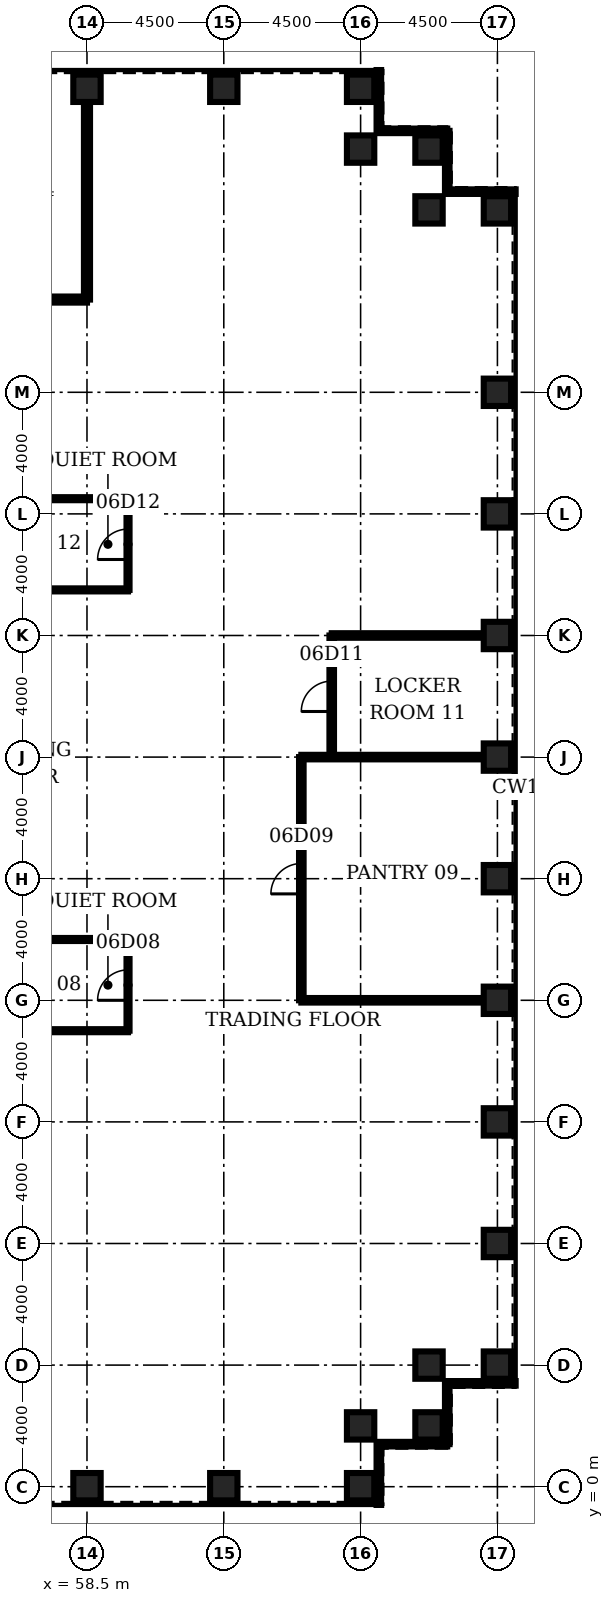
"""IFC4 building model, lengths in metres.
Left out: names, types, materials, properties, quantities, classifications, styles, units other than length and angle.
Written with IfcOpenShell. Run it as: python <this file> out.ifc"""

import sys

from ifc_helpers import new_model, si_unit, direction, frame, frame_2d, origin, origin_2d, place, context, subcontext, project, spatial, rectangle, hollow_rectangle, extrude, element, fill, save


model = new_model("IFC4")
c1 = context("Model", 3, precision=1e-05, world=origin(), true_north=direction((0.0, 1.0)))
c2 = subcontext(c1, "Body", "Model", "MODEL_VIEW")
j1 = project(units=[si_unit("LENGTHUNIT", "METRE"), si_unit("PLANEANGLEUNIT", "RADIAN")], contexts=[c1])
p1 = place(None, origin())
s1 = spatial("IfcSite", under=j1, at=p1, CompositionType="ELEMENT")
p2 = place(p1, origin())
s2 = spatial("IfcBuilding", under=s1, at=p2, CompositionType="ELEMENT")
p3 = place(p2, frame((0.0, 0.0, 32.0)))
s3 = spatial("IfcBuildingStorey", under=s2, at=p3, CompositionType="ELEMENT", Elevation=32.0)
for number, where, z_axis, x_axis in (
    (1, (58.5, 0.0, 0.0), (0.0, 0.0, 1.0), (0.0, 1.0, 0.0)),
    (2, (63.0, 0.0, 0.0), (0.0, 0.0, 1.0), (0.0, 1.0, 0.0)),
    (3, (67.5, 0.0, 0.0), (0.0, 0.0, 1.0), (0.0, 1.0, 0.0)),
    (4, (67.5, 2.0, 0.0), (0.0, 0.0, 1.0), (0.0, 1.0, 0.0)),
    (5, (69.75, 2.0, 0.0), (0.0, 0.0, 1.0), (1.0, 0.0, 0.0)),
    (6, (69.75, 4.0, 0.0), (0.0, 0.0, 1.0), (1.0, 0.0, 0.0)),
    (7, (72.0, 4.0, 0.0), (0.0, 0.0, 1.0), (1.0, 0.0, 0.0)),
    (8, (72.0, 8.0, 0.0), (0.0, 0.0, 1.0), (1.0, 0.0, 0.0)),
    (9, (72.0, 12.0, 0.0), (0.0, 0.0, 1.0), (1.0, 0.0, 0.0)),
    (10, (72.0, 16.0, 0.0), (0.0, 0.0, 1.0), (1.0, 0.0, 0.0)),
    (11, (72.0, 20.0, 0.0), (0.0, 0.0, 1.0), (1.0, 0.0, 0.0)),
    (12, (72.0, 24.0, 0.0), (0.0, 0.0, 1.0), (1.0, 0.0, 0.0)),
    (13, (72.0, 28.0, 0.0), (0.0, 0.0, 1.0), (1.0, 0.0, 0.0)),
    (14, (72.0, 32.0, 0.0), (0.0, 0.0, 1.0), (1.0, 0.0, 0.0)),
    (15, (72.0, 36.0, 0.0), (0.0, 0.0, 1.0), (1.0, 0.0, 0.0)),
    (16, (72.0, 42.0, 0.0), (0.0, 0.0, 1.0), (1.0, 0.0, 0.0)),
    (17, (69.75, 42.0, 0.0), (0.0, 0.0, 1.0), (1.0, 0.0, 0.0)),
    (18, (69.75, 44.0, 0.0), (0.0, 0.0, 1.0), (1.0, 0.0, 0.0)),
    (19, (67.5, 44.0, 0.0), (0.0, 0.0, 1.0), (0.0, 1.0, 0.0)),
    (20, (67.5, 46.0, 0.0), (0.0, 0.0, 1.0), (0.0, 1.0, 0.0)),
    (21, (63.0, 46.0, 0.0), (0.0, 0.0, 1.0), (0.0, 1.0, 0.0)),
    (22, (58.5, 46.0, 0.0), (0.0, 0.0, 1.0), (0.0, 1.0, 0.0)),
):
    element("IfcColumn", number, at=place(p3, frame(where, z_axis=z_axis, x_axis=x_axis)), inside=s3, PredefinedType="COLUMN", context=c2, shape_type="SweptSolid", body=[
        extrude(hollow_rectangle(XDim=0.9, YDim=0.9, WallThickness=0.12, at=origin_2d()), origin(), (0.0, 0.0, 1.0), 4.5),
    ])
p4 = place(p3, frame((56.85, 15.0, 0.0), z_axis=(0.0, 0.0, 1.0), x_axis=(1.0, 0.0, 0.0)))
e23 = element("IfcWall", 23, at=p4, inside=s3, PredefinedType="PARTITIONING", context=c2, shape_type="SweptSolid", body=[
    extrude(rectangle(XDim=3.0, YDim=0.1, at=frame_2d((1.5, 0.0))), origin(), (0.0, 0.0, 1.0), 3.0),
])
p5 = place(p3, frame((65.55, 16.0, 0.0), z_axis=(0.0, 0.0, 1.0), x_axis=(1.0, 0.0, 0.0)))
e24 = element("IfcWall", 24, at=p5, inside=s3, PredefinedType="PARTITIONING", context=c2, shape_type="SweptSolid", body=[
    extrude(rectangle(XDim=6.0, YDim=0.15, at=frame_2d((3.0, 0.0))), origin(), (0.0, 0.0, 1.0), 3.0),
])
p6 = place(p3, frame((56.85, 18.0, 0.0), z_axis=(0.0, 0.0, 1.0), x_axis=(1.0, 0.0, 0.0)))
e25 = element("IfcWall", 25, at=p6, inside=s3, PredefinedType="PARTITIONING", context=c2, shape_type="SweptSolid", body=[
    extrude(rectangle(XDim=3.0, YDim=0.1, at=frame_2d((1.5, 0.0))), origin(), (0.0, 0.0, 1.0), 3.0),
])
p7 = place(p3, frame((65.55, 24.0, 0.0), z_axis=(0.0, 0.0, 1.0), x_axis=(1.0, 0.0, 0.0)))
e26 = element("IfcWall", 26, at=p7, inside=s3, PredefinedType="PARTITIONING", context=c2, shape_type="SweptSolid", body=[
    extrude(rectangle(XDim=6.0, YDim=0.15, at=frame_2d((3.0, 0.0))), origin(), (0.0, 0.0, 1.0), 3.0),
])
p8 = place(p3, frame((66.55, 28.0, 0.0), z_axis=(0.0, 0.0, 1.0), x_axis=(1.0, 0.0, 0.0)))
e27 = element("IfcWall", 27, at=p8, inside=s3, PredefinedType="PARTITIONING", context=c2, shape_type="SweptSolid", body=[
    extrude(rectangle(XDim=5.0, YDim=0.15, at=frame_2d((2.5, 0.0))), origin(), (0.0, 0.0, 1.0), 3.0),
])
for number, where, z_axis, x_axis in (
    (28, (56.85, 29.5, 0.0), (0.0, 0.0, 1.0), (1.0, 0.0, 0.0)),
    (29, (56.85, 32.5, 0.0), (0.0, 0.0, 1.0), (1.0, 0.0, 0.0)),
):
    element("IfcWall", number, at=place(p3, frame(where, z_axis=z_axis, x_axis=x_axis)), inside=s3, PredefinedType="PARTITIONING", context=c2, shape_type="SweptSolid", body=[
        extrude(rectangle(XDim=3.0, YDim=0.1, at=frame_2d((1.5, 0.0))), origin(), (0.0, 0.0, 1.0), 3.0),
    ])
p9 = place(p3, frame((49.5, 39.05, 0.0), z_axis=(0.0, 0.0, 1.0), x_axis=(1.0, 0.0, 0.0)))
e30 = element("IfcWall", 30, at=p9, inside=s3, PredefinedType="PARTITIONING", context=c2, shape_type="SweptSolid", body=[
    extrude(rectangle(XDim=9.0, YDim=0.2, at=frame_2d((4.5, 0.0))), origin(), (0.0, 0.0, 1.0), 3.0),
])
p10 = place(p9, frame((0.45, 0.0, 0.0)))
e31 = element("IfcOpeningElement", 31, at=p10, cuts=e30, PredefinedType="OPENING", context=c2, shape_type="SweptSolid", body=[
    extrude(rectangle(XDim=1.6, YDim=2.1, at=frame_2d((0.8, 1.05))), frame((0.0, 0.11, 0.0), z_axis=(0.0, -1.0, 0.0), x_axis=(1.0, 0.0, 0.0)), (0.0, 0.0, 1.0), 0.22),
])
p11 = place(p3, frame((58.5, 39.05, 0.0), z_axis=(0.0, 0.0, 1.0), x_axis=(0.0, 1.0, 0.0)))
e32 = element("IfcWall", 32, at=p11, inside=s3, PredefinedType="PARTITIONING", context=c2, shape_type="SweptSolid", body=[
    extrude(rectangle(XDim=6.5, YDim=0.2, at=frame_2d((3.25, 0.0))), origin(), (0.0, 0.0, 1.0), 3.0),
])
p12 = place(p3, frame((59.85, 15.0, 0.0), z_axis=(0.0, 0.0, 1.0), x_axis=(0.0, 1.0, 0.0)))
e33 = element("IfcWall", 33, at=p12, inside=s3, PredefinedType="PARTITIONING", context=c2, shape_type="SweptSolid", body=[
    extrude(rectangle(XDim=3.0, YDim=0.1, at=frame_2d((1.5, 0.0))), origin(), (0.0, 0.0, 1.0), 3.0),
])
p13 = place(p12, frame((1.0, 0.0, 0.0)))
e34 = element("IfcOpeningElement", 34, at=p13, cuts=e33, PredefinedType="OPENING", context=c2, shape_type="SweptSolid", body=[
    extrude(rectangle(XDim=1.0, YDim=2.1, at=frame_2d((0.5, 1.05))), frame((0.0, 0.06, 0.0), z_axis=(0.0, -1.0, 0.0), x_axis=(1.0, 0.0, 0.0)), (0.0, 0.0, 1.0), 0.12),
])
p14 = place(p3, frame((59.85, 29.5, 0.0), z_axis=(0.0, 0.0, 1.0), x_axis=(0.0, 1.0, 0.0)))
e35 = element("IfcWall", 35, at=p14, inside=s3, PredefinedType="PARTITIONING", context=c2, shape_type="SweptSolid", body=[
    extrude(rectangle(XDim=3.0, YDim=0.1, at=frame_2d((1.5, 0.0))), origin(), (0.0, 0.0, 1.0), 3.0),
])
p15 = place(p14, frame((1.0, 0.0, 0.0)))
e36 = element("IfcOpeningElement", 36, at=p15, cuts=e35, PredefinedType="OPENING", context=c2, shape_type="SweptSolid", body=[
    extrude(rectangle(XDim=1.0, YDim=2.1, at=frame_2d((0.5, 1.05))), frame((0.0, 0.06, 0.0), z_axis=(0.0, -1.0, 0.0), x_axis=(1.0, 0.0, 0.0)), (0.0, 0.0, 1.0), 0.12),
])
p16 = place(p3, frame((65.55, 16.0, 0.0), z_axis=(0.0, 0.0, 1.0), x_axis=(0.0, 1.0, 0.0)))
e37 = element("IfcWall", 37, at=p16, inside=s3, PredefinedType="PARTITIONING", context=c2, shape_type="SweptSolid", body=[
    extrude(rectangle(XDim=8.0, YDim=0.15, at=frame_2d((4.0, 0.0))), origin(), (0.0, 0.0, 1.0), 3.0),
])
p17 = place(p16, frame((3.5, 0.0, 0.0)))
e38 = element("IfcOpeningElement", 38, at=p17, cuts=e37, PredefinedType="OPENING", context=c2, shape_type="SweptSolid", body=[
    extrude(rectangle(XDim=1.0, YDim=2.1, at=frame_2d((0.5, 1.05))), frame((0.0, 0.085, 0.0), z_axis=(0.0, -1.0, 0.0), x_axis=(1.0, 0.0, 0.0)), (0.0, 0.0, 1.0), 0.17),
])
p18 = place(p3, frame((66.55, 24.0, 0.0), z_axis=(0.0, 0.0, 1.0), x_axis=(0.0, 1.0, 0.0)))
e39 = element("IfcWall", 39, at=p18, inside=s3, PredefinedType="PARTITIONING", context=c2, shape_type="SweptSolid", body=[
    extrude(rectangle(XDim=4.0, YDim=0.15, at=frame_2d((2.0, 0.0))), origin(), (0.0, 0.0, 1.0), 3.0),
])
p19 = place(p18, frame((1.5, 0.0, 0.0)))
e40 = element("IfcOpeningElement", 40, at=p19, cuts=e39, PredefinedType="OPENING", context=c2, shape_type="SweptSolid", body=[
    extrude(rectangle(XDim=1.0, YDim=2.1, at=frame_2d((0.5, 1.05))), frame((0.0, 0.085, 0.0), z_axis=(0.0, -1.0, 0.0), x_axis=(1.0, 0.0, 0.0)), (0.0, 0.0, 1.0), 0.17),
])
p20 = place(p3, frame((68.1, -0.6, 0.0), z_axis=(0.0, 0.0, 1.0), x_axis=(0.0, 1.0, 0.0)))
e41 = element("IfcWall", 41, at=p20, inside=s3, PredefinedType="ELEMENTEDWALL", context=c2, shape_type="SweptSolid", body=[
    extrude(rectangle(XDim=2.0, YDim=0.15, at=frame_2d((1.0, 0.0))), origin(), (0.0, 0.0, 1.0), 4.32),
])
p21 = place(p3, frame((68.1, 1.4, 0.0), z_axis=(0.0, 0.0, 1.0), x_axis=(1.0, 0.0, 0.0)))
e42 = element("IfcWall", 42, at=p21, inside=s3, PredefinedType="ELEMENTEDWALL", context=c2, shape_type="SweptSolid", body=[
    extrude(rectangle(XDim=2.25, YDim=0.15, at=frame_2d((1.125, 0.0))), origin(), (0.0, 0.0, 1.0), 4.32),
])
p22 = place(p3, frame((70.35, 1.4, 0.0), z_axis=(0.0, 0.0, 1.0), x_axis=(0.0, 1.0, 0.0)))
e43 = element("IfcWall", 43, at=p22, inside=s3, PredefinedType="ELEMENTEDWALL", context=c2, shape_type="SweptSolid", body=[
    extrude(rectangle(XDim=2.0, YDim=0.15, at=frame_2d((1.0, 0.0))), origin(), (0.0, 0.0, 1.0), 4.32),
])
for number, where, z_axis, x_axis in (
    (44, (70.35, 3.4, 0.0), (0.0, 0.0, 1.0), (1.0, 0.0, 0.0)),
    (45, (72.6, 42.6, 0.0), (0.0, 0.0, 1.0), (-1.0, 0.0, 0.0)),
):
    element("IfcWall", number, at=place(p3, frame(where, z_axis=z_axis, x_axis=x_axis)), inside=s3, PredefinedType="ELEMENTEDWALL", context=c2, shape_type="SweptSolid", body=[
        extrude(rectangle(XDim=2.25, YDim=0.15, at=frame_2d((1.125, 0.0))), origin(), (0.0, 0.0, 1.0), 4.32),
    ])
p23 = place(p3, frame((70.35, 42.6, 0.0), z_axis=(0.0, 0.0, 1.0), x_axis=(0.0, 1.0, 0.0)))
e46 = element("IfcWall", 46, at=p23, inside=s3, PredefinedType="ELEMENTEDWALL", context=c2, shape_type="SweptSolid", body=[
    extrude(rectangle(XDim=2.0, YDim=0.15, at=frame_2d((1.0, 0.0))), origin(), (0.0, 0.0, 1.0), 4.32),
])
p24 = place(p3, frame((70.35, 44.6, 0.0), z_axis=(0.0, 0.0, 1.0), x_axis=(-1.0, 0.0, 0.0)))
e47 = element("IfcWall", 47, at=p24, inside=s3, PredefinedType="ELEMENTEDWALL", context=c2, shape_type="SweptSolid", body=[
    extrude(rectangle(XDim=2.25, YDim=0.15, at=frame_2d((1.125, 0.0))), origin(), (0.0, 0.0, 1.0), 4.32),
])
p25 = place(p3, frame((68.1, 44.6, 0.0), z_axis=(0.0, 0.0, 1.0), x_axis=(0.0, 1.0, 0.0)))
e48 = element("IfcWall", 48, at=p25, inside=s3, PredefinedType="ELEMENTEDWALL", context=c2, shape_type="SweptSolid", body=[
    extrude(rectangle(XDim=2.0, YDim=0.15, at=frame_2d((1.0, 0.0))), origin(), (0.0, 0.0, 1.0), 4.32),
])
p26 = place(p13, origin())
e49 = element("IfcDoor", 49, at=p26, inside=s3, OperationType="SINGLE_SWING_LEFT", PredefinedType="DOOR", context=c2, shape_type="SweptSolid", body=[
    extrude(rectangle(XDim=1.0, YDim=2.1, at=frame_2d((0.5, 1.05))), frame((0.0, 0.025, 0.0), z_axis=(0.0, -1.0, 0.0), x_axis=(1.0, 0.0, 0.0)), (0.0, 0.0, 1.0), 0.05),
])
fill(e34, e49)
p27 = place(p17, origin())
e50 = element("IfcDoor", 50, at=p27, inside=s3, OperationType="SINGLE_SWING_LEFT", PredefinedType="DOOR", context=c2, shape_type="SweptSolid", body=[
    extrude(rectangle(XDim=1.0, YDim=2.1, at=frame_2d((0.5, 1.05))), frame((0.0, 0.025, 0.0), z_axis=(0.0, -1.0, 0.0), x_axis=(1.0, 0.0, 0.0)), (0.0, 0.0, 1.0), 0.05),
])
fill(e38, e50)
p28 = place(p19, origin())
e51 = element("IfcDoor", 51, at=p28, inside=s3, OperationType="SINGLE_SWING_LEFT", PredefinedType="DOOR", context=c2, shape_type="SweptSolid", body=[
    extrude(rectangle(XDim=1.0, YDim=2.1, at=frame_2d((0.5, 1.05))), frame((0.0, 0.025, 0.0), z_axis=(0.0, -1.0, 0.0), x_axis=(1.0, 0.0, 0.0)), (0.0, 0.0, 1.0), 0.05),
])
fill(e40, e51)
p29 = place(p15, origin())
e52 = element("IfcDoor", 52, at=p29, inside=s3, OperationType="SINGLE_SWING_LEFT", PredefinedType="DOOR", context=c2, shape_type="SweptSolid", body=[
    extrude(rectangle(XDim=1.0, YDim=2.1, at=frame_2d((0.5, 1.05))), frame((0.0, 0.025, 0.0), z_axis=(0.0, -1.0, 0.0), x_axis=(1.0, 0.0, 0.0)), (0.0, 0.0, 1.0), 0.05),
])
fill(e36, e52)
save(model, sys.argv[1])
